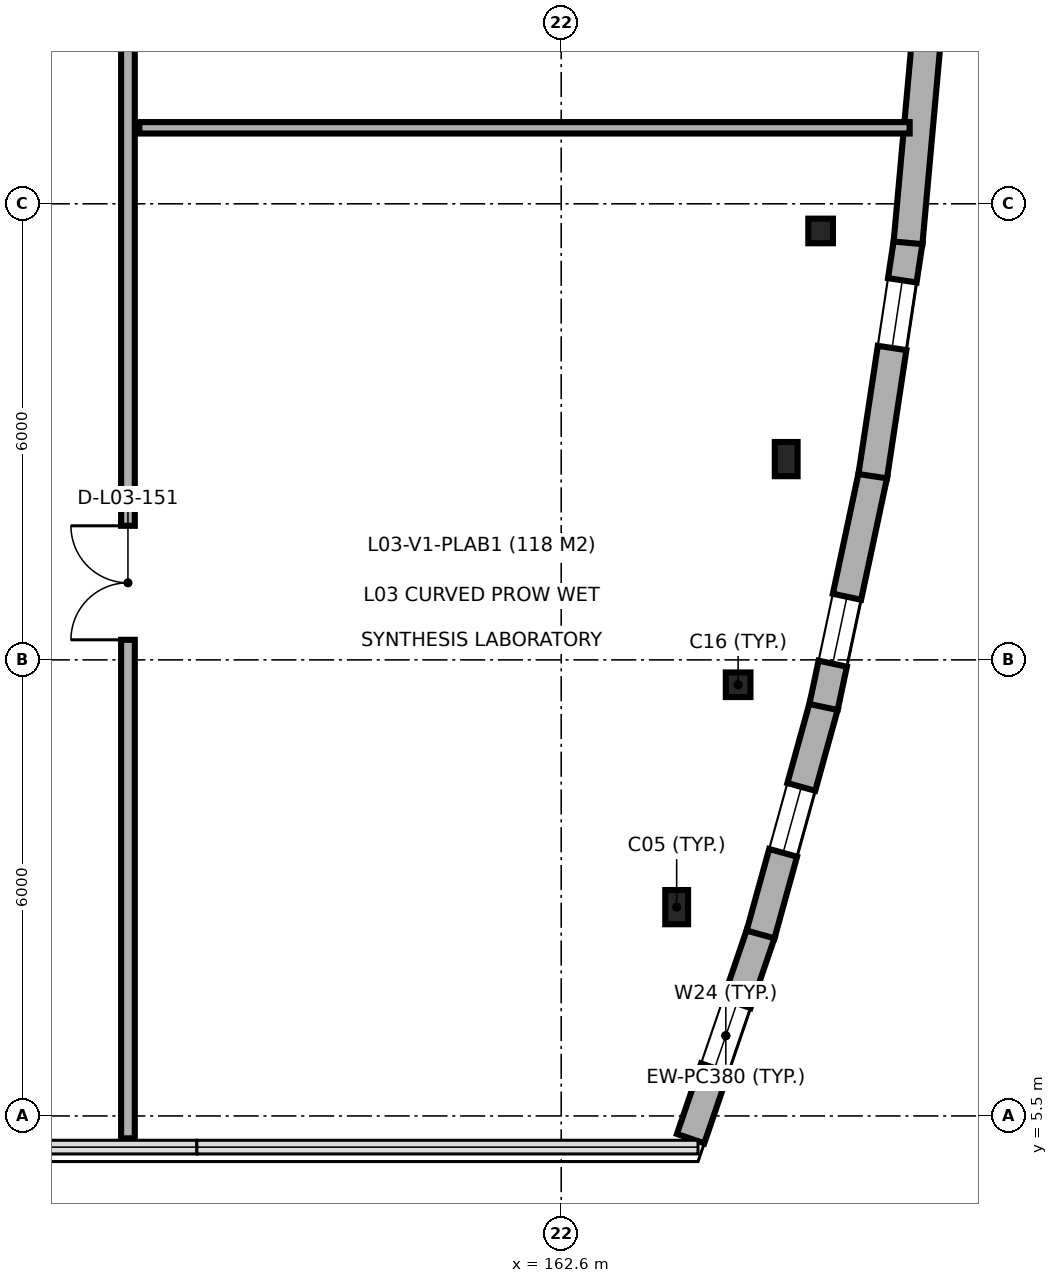
"""IFC4 building model, lengths in metres.
Left out: names, types, materials, properties, quantities, classifications, styles, units other than length and angle.
Written with IfcOpenShell. Run it as: python <this file> out.ifc"""

import sys

from ifc_helpers import new_model, si_unit, direction, frame, frame_2d, origin, origin_2d, place, context, subcontext, project, spatial, rectangle, hollow_circle, i_section, extrude, element, fill, save


model = new_model("IFC4")
c1 = context("Model", 3, precision=1e-05, world=origin(), true_north=direction((0.0, 1.0)))
c2 = subcontext(c1, "Body", "Model", "MODEL_VIEW")
j1 = project(units=[si_unit("LENGTHUNIT", "METRE"), si_unit("PLANEANGLEUNIT", "RADIAN")], contexts=[c1])
p1 = place(None, origin())
s1 = spatial("IfcSite", under=j1, at=p1, CompositionType="ELEMENT")
p2 = place(p1, origin())
s2 = spatial("IfcBuilding", under=s1, at=p2, CompositionType="ELEMENT")
p3 = place(p2, frame((0.0, 0.0, 13.8)))
s3 = spatial("IfcBuildingStorey", under=s2, at=p3, CompositionType="ELEMENT", Elevation=13.8)
p4 = place(p3, frame((164.119, 8.247, 0.0), z_axis=(0.0, 0.0, 1.0), x_axis=(1.0, 0.0, 0.0)))
e1 = element("IfcColumn", 1, at=p4, inside=s3, PredefinedType="COLUMN", context=c2, shape_type="SweptSolid", body=[
    extrude(i_section(OverallWidth=0.3, OverallDepth=0.45, WebThickness=0.014, FlangeThickness=0.026, FilletRadius=0.027, at=origin_2d()), origin(), (0.0, 0.0, 1.0), 4.5),
])
p5 = place(p3, frame((164.928, 11.173, 0.0), z_axis=(0.0, 0.0, 1.0), x_axis=(1.0, 0.0, 0.0)))
e2 = element("IfcColumn", 2, at=p5, inside=s3, PredefinedType="COLUMN", context=c2, shape_type="SweptSolid", body=[
    extrude(hollow_circle(Radius=0.162, WallThickness=0.016, at=origin_2d()), origin(), (0.0, 0.0, 1.0), 4.5),
])
p6 = place(p3, frame((165.56, 14.142, 0.0), z_axis=(0.0, 0.0, 1.0), x_axis=(1.0, 0.0, 0.0)))
e3 = element("IfcColumn", 3, at=p6, inside=s3, PredefinedType="COLUMN", context=c2, shape_type="SweptSolid", body=[
    extrude(i_section(OverallWidth=0.3, OverallDepth=0.45, WebThickness=0.014, FlangeThickness=0.026, FilletRadius=0.027, at=origin_2d()), origin(), (0.0, 0.0, 1.0), 4.5),
])
p7 = place(p3, frame((166.013, 17.143, 0.0), z_axis=(0.0, 0.0, 1.0), x_axis=(1.0, 0.0, 0.0)))
e4 = element("IfcColumn", 4, at=p7, inside=s3, PredefinedType="COLUMN", context=c2, shape_type="SweptSolid", body=[
    extrude(hollow_circle(Radius=0.162, WallThickness=0.016, at=origin_2d()), origin(), (0.0, 0.0, 1.0), 4.5),
])
p8 = place(p3, frame((164.302, 5.201, 0.0), z_axis=(0.0, 0.0, 1.0), x_axis=(0.323739917301, 0.946146112366, 0.0)))
e5 = element("IfcWall", 5, at=p8, inside=s3, PredefinedType="SOLIDWALL", context=c2, shape_type="SweptSolid", body=[
    extrude(rectangle(XDim=2.863, YDim=0.38, at=frame_2d((1.431, 0.0))), origin(), (0.0, 0.0, 1.0), 4.25),
])
p9 = place(p8, frame((0.981, 0.0, 0.9)))
e6 = element("IfcOpeningElement", 6, at=p9, cuts=e5, PredefinedType="OPENING", context=c2, shape_type="SweptSolid", body=[
    extrude(rectangle(XDim=0.9, YDim=1.8, at=frame_2d((0.45, 0.9))), frame((0.0, 0.2, 0.0), z_axis=(0.0, -1.0, 0.0), x_axis=(1.0, 0.0, 0.0)), (0.0, 0.0, 1.0), 0.4),
])
p10 = place(p3, frame((165.222, 7.888, 0.0), z_axis=(0.0, 0.0, 1.0), x_axis=(0.266536691105, 0.963824772609, 0.0)))
e7 = element("IfcWall", 7, at=p10, inside=s3, PredefinedType="SOLIDWALL", context=c2, shape_type="SweptSolid", body=[
    extrude(rectangle(XDim=3.128, YDim=0.38, at=frame_2d((1.564, 0.0))), origin(), (0.0, 0.0, 1.0), 4.25),
])
p11 = place(p10, frame((1.114, 0.0, 0.9)))
e8 = element("IfcOpeningElement", 8, at=p11, cuts=e7, PredefinedType="OPENING", context=c2, shape_type="SweptSolid", body=[
    extrude(rectangle(XDim=0.9, YDim=1.8, at=frame_2d((0.45, 0.9))), frame((0.0, 0.2, 0.0), z_axis=(0.0, -1.0, 0.0), x_axis=(1.0, 0.0, 0.0)), (0.0, 0.0, 1.0), 0.4),
])
p12 = place(p3, frame((166.051, 10.88, 0.0), z_axis=(0.0, 0.0, 1.0), x_axis=(0.208287141705, 0.978067720866, 0.0)))
e9 = element("IfcWall", 9, at=p12, inside=s3, PredefinedType="SOLIDWALL", context=c2, shape_type="SweptSolid", body=[
    extrude(rectangle(XDim=3.128, YDim=0.38, at=frame_2d((1.564, 0.0))), origin(), (0.0, 0.0, 1.0), 4.25),
])
p13 = place(p12, frame((0.583, 0.0, 0.9)))
e10 = element("IfcOpeningElement", 10, at=p13, cuts=e9, PredefinedType="OPENING", context=c2, shape_type="SweptSolid", body=[
    extrude(rectangle(XDim=0.9, YDim=1.8, at=frame_2d((0.45, 0.9))), frame((0.0, 0.2, 0.0), z_axis=(0.0, -1.0, 0.0), x_axis=(1.0, 0.0, 0.0)), (0.0, 0.0, 1.0), 0.4),
])
p14 = place(p3, frame((166.698, 13.917, 0.0), z_axis=(0.0, 0.0, 1.0), x_axis=(0.149218139282, 0.988804301624, 0.0)))
e11 = element("IfcWall", 11, at=p14, inside=s3, PredefinedType="SOLIDWALL", context=c2, shape_type="SweptSolid", body=[
    extrude(rectangle(XDim=3.128, YDim=0.38, at=frame_2d((1.564, 0.0))), origin(), (0.0, 0.0, 1.0), 4.25),
])
p15 = place(p14, frame((1.706, 0.0, 0.9)))
e12 = element("IfcOpeningElement", 12, at=p15, cuts=e11, PredefinedType="OPENING", context=c2, shape_type="SweptSolid", body=[
    extrude(rectangle(XDim=0.9, YDim=1.8, at=frame_2d((0.45, 0.9))), frame((0.0, 0.2, 0.0), z_axis=(0.0, -1.0, 0.0), x_axis=(1.0, 0.0, 0.0)), (0.0, 0.0, 1.0), 0.4),
])
p16 = place(p3, frame((167.163, 16.987, 0.0), z_axis=(0.0, 0.0, 1.0), x_axis=(0.089747627339, 0.995964539222, 0.0)))
e13 = element("IfcWall", 13, at=p16, inside=s3, PredefinedType="SOLIDWALL", context=c2, shape_type="SweptSolid", body=[
    extrude(rectangle(XDim=3.128, YDim=0.38, at=frame_2d((1.564, 0.0))), origin(), (0.0, 0.0, 1.0), 4.25),
])
p17 = place(p3, frame((156.9, 5.205, 0.0), z_axis=(0.0, 0.0, 1.0), x_axis=(0.0, 1.0, 0.0)))
e14 = element("IfcWall", 14, at=p17, inside=s3, PredefinedType="PARTITIONING", context=c2, shape_type="SweptSolid", body=[
    extrude(rectangle(XDim=34.295, YDim=0.18, at=frame_2d((17.147, 0.0))), origin(), (0.0, 0.0, 1.0), 4.25),
])
p18 = place(p17, frame((6.559, 0.0, 0.0)))
e15 = element("IfcOpeningElement", 15, at=p18, cuts=e14, PredefinedType="OPENING", context=c2, shape_type="SweptSolid", body=[
    extrude(rectangle(XDim=1.5, YDim=2.2, at=frame_2d((0.75, 1.1))), frame((0.0, 0.1, 0.0), z_axis=(0.0, -1.0, 0.0), x_axis=(1.0, 0.0, 0.0)), (0.0, 0.0, 1.0), 0.2),
])
p19 = place(p17, frame((17.261, 0.0, 0.0)))
e16 = element("IfcOpeningElement", 16, at=p19, cuts=e14, PredefinedType="OPENING", context=c2, shape_type="SweptSolid", body=[
    extrude(rectangle(XDim=1.1, YDim=2.15, at=frame_2d((0.55, 1.075))), frame((0.0, 0.1, 0.0), z_axis=(0.0, -1.0, 0.0), x_axis=(1.0, 0.0, 0.0)), (0.0, 0.0, 1.0), 0.2),
])
p20 = place(p17, frame((27.343, 0.0, 0.0)))
e17 = element("IfcOpeningElement", 17, at=p20, cuts=e14, PredefinedType="OPENING", context=c2, shape_type="SweptSolid", body=[
    extrude(rectangle(XDim=0.95, YDim=2.1, at=frame_2d((0.475, 1.05))), frame((0.0, 0.1, 0.0), z_axis=(0.0, -1.0, 0.0), x_axis=(1.0, 0.0, 0.0)), (0.0, 0.0, 1.0), 0.2),
])
p21 = place(p3, frame((157.05, 18.5, 0.0), z_axis=(0.0, 0.0, 1.0), x_axis=(1.0, 0.0, 0.0)))
e18 = element("IfcWall", 18, at=p21, inside=s3, PredefinedType="PARTITIONING", context=c2, shape_type="SweptSolid", body=[
    extrude(rectangle(XDim=10.134, YDim=0.15, at=frame_2d((5.067, 0.0))), origin(), (0.0, 0.0, 1.0), 3.75),
])
p22 = place(p9, origin())
e19 = element("IfcWindow", 19, at=p22, inside=s3, PartitioningType="SINGLE_PANEL", PredefinedType="WINDOW", context=c2, shape_type="SweptSolid", body=[
    extrude(rectangle(XDim=0.9, YDim=1.8, at=frame_2d((0.45, 0.9))), frame((0.0, 0.03, 0.0), z_axis=(0.0, -1.0, 0.0), x_axis=(1.0, 0.0, 0.0)), (0.0, 0.0, 1.0), 0.06),
])
fill(e6, e19)
p23 = place(p11, origin())
e20 = element("IfcWindow", 20, at=p23, inside=s3, PartitioningType="SINGLE_PANEL", PredefinedType="WINDOW", context=c2, shape_type="SweptSolid", body=[
    extrude(rectangle(XDim=0.9, YDim=1.8, at=frame_2d((0.45, 0.9))), frame((0.0, 0.03, 0.0), z_axis=(0.0, -1.0, 0.0), x_axis=(1.0, 0.0, 0.0)), (0.0, 0.0, 1.0), 0.06),
])
fill(e8, e20)
p24 = place(p13, origin())
e21 = element("IfcWindow", 21, at=p24, inside=s3, PartitioningType="SINGLE_PANEL", PredefinedType="WINDOW", context=c2, shape_type="SweptSolid", body=[
    extrude(rectangle(XDim=0.9, YDim=1.8, at=frame_2d((0.45, 0.9))), frame((0.0, 0.03, 0.0), z_axis=(0.0, -1.0, 0.0), x_axis=(1.0, 0.0, 0.0)), (0.0, 0.0, 1.0), 0.06),
])
fill(e10, e21)
p25 = place(p15, origin())
e22 = element("IfcWindow", 22, at=p25, inside=s3, PartitioningType="SINGLE_PANEL", PredefinedType="WINDOW", context=c2, shape_type="SweptSolid", body=[
    extrude(rectangle(XDim=0.9, YDim=1.8, at=frame_2d((0.45, 0.9))), frame((0.0, 0.03, 0.0), z_axis=(0.0, -1.0, 0.0), x_axis=(1.0, 0.0, 0.0)), (0.0, 0.0, 1.0), 0.06),
])
fill(e12, e22)
p26 = place(p18, origin())
e23 = element("IfcDoor", 23, at=p26, inside=s3, OperationType="DOUBLE_DOOR_SINGLE_SWING", PredefinedType="DOOR", context=c2, shape_type="SweptSolid", body=[
    extrude(rectangle(XDim=1.5, YDim=2.2, at=frame_2d((0.75, 1.1))), frame((0.0, 0.025, 0.0), z_axis=(0.0, -1.0, 0.0), x_axis=(1.0, 0.0, 0.0)), (0.0, 0.0, 1.0), 0.05),
])
fill(e15, e23)
save(model, sys.argv[1])
